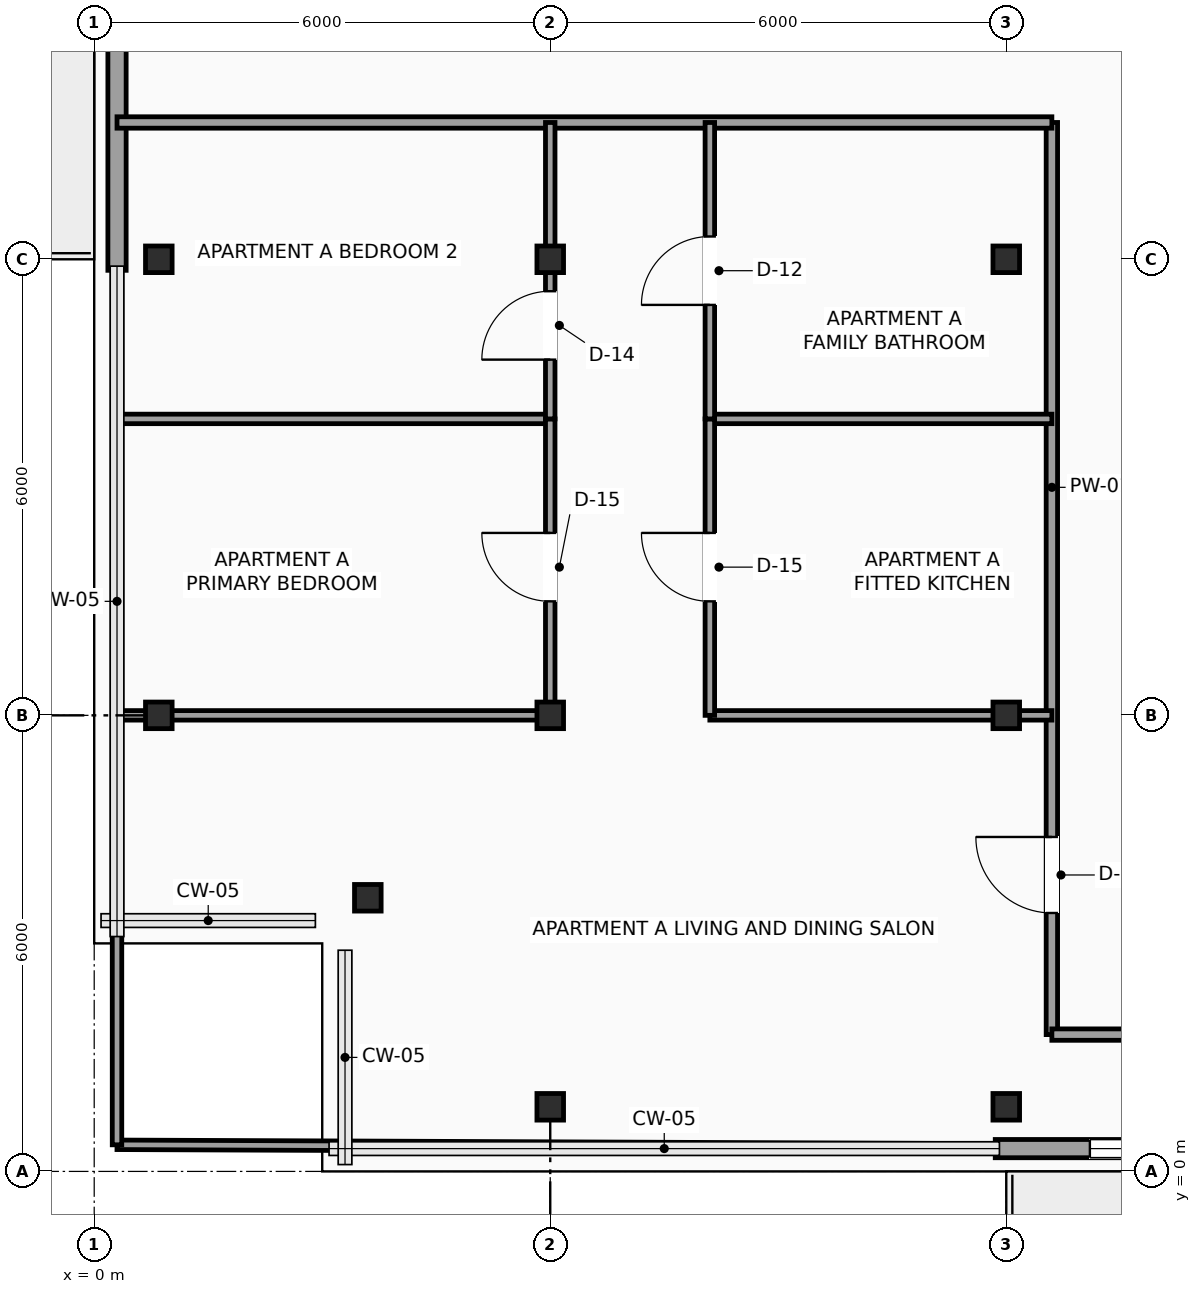
"""IFC4 building model, lengths in metres.
Left out: names, types, materials, properties, quantities, classifications, styles, units other than length and angle.
Written with IfcOpenShell. Run it as: python <this file> out.ifc"""

import sys

from ifc_helpers import new_model, si_unit, direction, frame, frame_2d, origin, origin_2d, place, context, subcontext, project, spatial, rectangle, hollow_rectangle, extrude, element, fill, save


model = new_model("IFC4")
c1 = context("Model", 3, precision=1e-05, world=origin(), true_north=direction((0.0, 1.0)))
c2 = subcontext(c1, "Body", "Model", "MODEL_VIEW")
j1 = project(units=[si_unit("LENGTHUNIT", "METRE"), si_unit("PLANEANGLEUNIT", "RADIAN")], contexts=[c1])
p1 = place(None, origin())
s1 = spatial("IfcSite", under=j1, at=p1, CompositionType="ELEMENT")
p2 = place(p1, origin())
s2 = spatial("IfcBuilding", under=s1, at=p2, CompositionType="ELEMENT")
p3 = place(p2, frame((0.0, 0.0, 264.2)))
s3 = spatial("IfcBuildingStorey", under=s2, at=p3, CompositionType="ELEMENT", Elevation=264.2)
for number, where, z_axis, x_axis in (
    (1, (3.6, 3.6, 0.0), (0.0, 0.0, 1.0), (1.0, 0.0, 0.0)),
    (2, (0.85, 6.0, 0.0), (0.0, 0.0, 1.0), (1.0, 0.0, 0.0)),
    (3, (0.85, 12.0, 0.0), (0.0, 0.0, 1.0), (1.0, 0.0, 0.0)),
    (4, (6.0, 0.85, 0.0), (0.0, 0.0, 1.0), (1.0, 0.0, 0.0)),
    (5, (6.0, 6.0, 0.0), (0.0, 0.0, 1.0), (1.0, 0.0, 0.0)),
    (6, (6.0, 12.0, 0.0), (0.0, 0.0, 1.0), (1.0, 0.0, 0.0)),
    (7, (12.0, 0.85, 0.0), (0.0, 0.0, 1.0), (1.0, 0.0, 0.0)),
    (8, (12.0, 6.0, 0.0), (0.0, 0.0, 1.0), (1.0, 0.0, 0.0)),
    (9, (12.0, 12.0, 0.0), (0.0, 0.0, 1.0), (1.0, 0.0, 0.0)),
):
    element("IfcColumn", number, at=place(p3, frame(where, z_axis=z_axis, x_axis=x_axis)), inside=s3, PredefinedType="COLUMN", context=c2, shape_type="SweptSolid", body=[
        extrude(hollow_rectangle(XDim=0.35, YDim=0.35, WallThickness=0.016, InnerFilletRadius=0.016, OuterFilletRadius=0.032, at=origin_2d()), origin(), (0.0, 0.0, 1.0), 3.5),
    ])
p4 = place(p3, frame((21.145, 0.3, 0.0), z_axis=(0.0, 0.0, 1.0), x_axis=(-1.0, 0.0, 0.0)))
e10 = element("IfcWall", 10, at=p4, inside=s3, PredefinedType="SOLIDWALL", context=c2, shape_type="SweptSolid", body=[
    extrude(rectangle(XDim=9.29, YDim=0.24, at=frame_2d((4.645, 0.0))), origin(), (0.0, 0.0, 1.0), 3.3),
])
p5 = place(p4, frame((3.945, 0.0, 0.0)))
e11 = element("IfcOpeningElement", 11, at=p5, cuts=e10, PredefinedType="OPENING", context=c2, shape_type="SweptSolid", body=[
    extrude(rectangle(XDim=1.05, YDim=2.2, at=frame_2d((0.525, 1.1))), frame((0.0, 0.13, 0.0), z_axis=(0.0, -1.0, 0.0), x_axis=(1.0, 0.0, 0.0)), (0.0, 0.0, 1.0), 0.26),
])
p6 = place(p4, frame((5.345, 0.0, 0.6)))
e12 = element("IfcOpeningElement", 12, at=p6, cuts=e10, PredefinedType="OPENING", context=c2, shape_type="SweptSolid", body=[
    extrude(rectangle(XDim=2.7, YDim=2.3, at=frame_2d((1.35, 1.15))), frame((0.0, 0.13, 0.0), z_axis=(0.0, -1.0, 0.0), x_axis=(1.0, 0.0, 0.0)), (0.0, 0.0, 1.0), 0.26),
])
p7 = place(p4, frame((1.4, 0.0, 0.6)))
e13 = element("IfcOpeningElement", 13, at=p7, cuts=e10, PredefinedType="OPENING", context=c2, shape_type="SweptSolid", body=[
    extrude(rectangle(XDim=0.9, YDim=2.2, at=frame_2d((0.45, 1.1))), frame((0.0, 0.13, 0.0), z_axis=(0.0, -1.0, 0.0), x_axis=(1.0, 0.0, 0.0)), (0.0, 0.0, 1.0), 0.26),
])
p8 = place(p3, frame((0.3, 11.855, 0.0), z_axis=(0.0, 0.0, 1.0), x_axis=(0.0, 1.0, 0.0)))
e14 = element("IfcWall", 14, at=p8, inside=s3, PredefinedType="SOLIDWALL", context=c2, shape_type="SweptSolid", body=[
    extrude(rectangle(XDim=9.29, YDim=0.24, at=frame_2d((4.645, 0.0))), origin(), (0.0, 0.0, 1.0), 3.3),
])
p9 = place(p8, frame((4.7, 0.0, 0.0)))
e15 = element("IfcOpeningElement", 15, at=p9, cuts=e14, PredefinedType="OPENING", context=c2, shape_type="SweptSolid", body=[
    extrude(rectangle(XDim=1.05, YDim=2.2, at=frame_2d((0.525, 1.1))), frame((0.0, 0.13, 0.0), z_axis=(0.0, -1.0, 0.0), x_axis=(1.0, 0.0, 0.0)), (0.0, 0.0, 1.0), 0.26),
])
p10 = place(p8, frame((6.05, 0.0, 0.6)))
e16 = element("IfcOpeningElement", 16, at=p10, cuts=e14, PredefinedType="OPENING", context=c2, shape_type="SweptSolid", body=[
    extrude(rectangle(XDim=2.7, YDim=2.3, at=frame_2d((1.35, 1.15))), frame((0.0, 0.13, 0.0), z_axis=(0.0, -1.0, 0.0), x_axis=(1.0, 0.0, 0.0)), (0.0, 0.0, 1.0), 0.26),
])
p11 = place(p8, frame((2.9, 0.0, 0.6)))
e17 = element("IfcOpeningElement", 17, at=p11, cuts=e14, PredefinedType="OPENING", context=c2, shape_type="SweptSolid", body=[
    extrude(rectangle(XDim=0.9, YDim=2.2, at=frame_2d((0.45, 1.1))), frame((0.0, 0.13, 0.0), z_axis=(0.0, -1.0, 0.0), x_axis=(1.0, 0.0, 0.0)), (0.0, 0.0, 1.0), 0.26),
])
p12 = place(p3, frame((12.6, 1.8, 0.0), z_axis=(0.0, 0.0, 1.0), x_axis=(0.0, 1.0, 0.0)))
e18 = element("IfcWall", 18, at=p12, inside=s3, PredefinedType="PARTITIONING", context=c2, shape_type="SweptSolid", body=[
    extrude(rectangle(XDim=12.0, YDim=0.15, at=frame_2d((6.0, 0.0))), origin(), (0.0, 0.0, 1.0), 3.3),
])
p13 = place(p12, frame((1.6, 0.0, 0.0)))
e19 = element("IfcOpeningElement", 19, at=p13, cuts=e18, PredefinedType="OPENING", context=c2, shape_type="SweptSolid", body=[
    extrude(rectangle(XDim=1.0, YDim=2.2, at=frame_2d((0.5, 1.1))), frame((0.0, 0.085, 0.0), z_axis=(0.0, -1.0, 0.0), x_axis=(1.0, 0.0, 0.0)), (0.0, 0.0, 1.0), 0.17),
])
p14 = place(p3, frame((12.6, 13.8, 0.0), z_axis=(0.0, 0.0, 1.0), x_axis=(-1.0, 0.0, 0.0)))
e20 = element("IfcWall", 20, at=p14, inside=s3, PredefinedType="PARTITIONING", context=c2, shape_type="SweptSolid", body=[
    extrude(rectangle(XDim=12.3, YDim=0.15, at=frame_2d((6.15, 0.0))), origin(), (0.0, 0.0, 1.0), 3.3),
])
p15 = place(p3, frame((14.95, 1.8, 0.0), z_axis=(0.0, 0.0, 1.0), x_axis=(-1.0, 0.0, 0.0)))
e21 = element("IfcWall", 21, at=p15, inside=s3, PredefinedType="PARTITIONING", context=c2, shape_type="SweptSolid", body=[
    extrude(rectangle(XDim=2.35, YDim=0.15, at=frame_2d((1.175, 0.0))), origin(), (0.0, 0.0, 1.0), 3.3),
])
p16 = place(p3, frame((0.3, 0.35, 0.0), z_axis=(0.0, 0.0, 1.0), x_axis=(0.999991685722, -0.004077804208, 0.0)))
e22 = element("IfcWall", 22, at=p16, inside=s3, PredefinedType="PARTITIONING", context=c2, shape_type="SweptSolid", body=[
    extrude(rectangle(XDim=11.555, YDim=0.125, at=frame_2d((5.777, 0.0))), origin(), (0.0, 0.0, 1.0), 3.3),
])
p17 = place(p3, frame((0.3, 0.35, 0.0), z_axis=(0.0, 0.0, 1.0), x_axis=(0.0, 1.0, 0.0)))
e23 = element("IfcWall", 23, at=p17, inside=s3, PredefinedType="PARTITIONING", context=c2, shape_type="SweptSolid", body=[
    extrude(rectangle(XDim=11.505, YDim=0.125, at=frame_2d((5.752, 0.0))), origin(), (0.0, 0.0, 1.0), 3.3),
])
p18 = place(p3, frame((8.1, 6.0, 0.0), z_axis=(0.0, 0.0, 1.0), x_axis=(1.0, 0.0, 0.0)))
e24 = element("IfcWall", 24, at=p18, inside=s3, PredefinedType="PARTITIONING", context=c2, shape_type="SweptSolid", body=[
    extrude(rectangle(XDim=4.5, YDim=0.125, at=frame_2d((2.25, 0.0))), origin(), (0.0, 0.0, 1.0), 2.992),
])
p19 = place(p3, frame((8.1, 9.9, 0.0), z_axis=(0.0, 0.0, 1.0), x_axis=(1.0, 0.0, 0.0)))
e25 = element("IfcWall", 25, at=p19, inside=s3, PredefinedType="PARTITIONING", context=c2, shape_type="SweptSolid", body=[
    extrude(rectangle(XDim=4.5, YDim=0.125, at=frame_2d((2.25, 0.0))), origin(), (0.0, 0.0, 1.0), 3.3),
])
p20 = place(p3, frame((8.1, 6.0, 0.0), z_axis=(0.0, 0.0, 1.0), x_axis=(0.0, 1.0, 0.0)))
e26 = element("IfcWall", 26, at=p20, inside=s3, PredefinedType="PARTITIONING", context=c2, shape_type="SweptSolid", body=[
    extrude(rectangle(XDim=3.9, YDim=0.125, at=frame_2d((1.95, 0.0))), origin(), (0.0, 0.0, 1.0), 3.3),
])
p21 = place(p20, frame((1.5, 0.0, 0.0)))
e27 = element("IfcOpeningElement", 27, at=p21, cuts=e26, PredefinedType="OPENING", context=c2, shape_type="SweptSolid", body=[
    extrude(rectangle(XDim=0.9, YDim=2.1, at=frame_2d((0.45, 1.05))), frame((0.0, 0.073, 0.0), z_axis=(0.0, -1.0, 0.0), x_axis=(1.0, 0.0, 0.0)), (0.0, 0.0, 1.0), 0.145),
])
p22 = place(p3, frame((8.1, 9.9, 0.0), z_axis=(0.0, 0.0, 1.0), x_axis=(0.0, 1.0, 0.0)))
e28 = element("IfcWall", 28, at=p22, inside=s3, PredefinedType="PARTITIONING", context=c2, shape_type="SweptSolid", body=[
    extrude(rectangle(XDim=3.9, YDim=0.125, at=frame_2d((1.95, 0.0))), origin(), (0.0, 0.0, 1.0), 3.3),
])
p23 = place(p22, frame((1.5, 0.0, 0.0)))
e29 = element("IfcOpeningElement", 29, at=p23, cuts=e28, PredefinedType="OPENING", context=c2, shape_type="SweptSolid", body=[
    extrude(rectangle(XDim=0.9, YDim=2.1, at=frame_2d((0.45, 1.05))), frame((0.0, 0.073, 0.0), z_axis=(0.0, -1.0, 0.0), x_axis=(1.0, 0.0, 0.0)), (0.0, 0.0, 1.0), 0.145),
])
p24 = place(p3, frame((0.3, 6.0, 0.0), z_axis=(0.0, 0.0, 1.0), x_axis=(1.0, 0.0, 0.0)))
e30 = element("IfcWall", 30, at=p24, inside=s3, PredefinedType="PARTITIONING", context=c2, shape_type="SweptSolid", body=[
    extrude(rectangle(XDim=5.7, YDim=0.125, at=frame_2d((2.85, 0.0))), origin(), (0.0, 0.0, 1.0), 2.992),
])
p25 = place(p3, frame((0.3, 9.9, 0.0), z_axis=(0.0, 0.0, 1.0), x_axis=(1.0, 0.0, 0.0)))
e31 = element("IfcWall", 31, at=p25, inside=s3, PredefinedType="PARTITIONING", context=c2, shape_type="SweptSolid", body=[
    extrude(rectangle(XDim=5.7, YDim=0.125, at=frame_2d((2.85, 0.0))), origin(), (0.0, 0.0, 1.0), 3.3),
])
p26 = place(p3, frame((6.0, 6.0, 0.0), z_axis=(0.0, 0.0, 1.0), x_axis=(0.0, 1.0, 0.0)))
e32 = element("IfcWall", 32, at=p26, inside=s3, PredefinedType="PARTITIONING", context=c2, shape_type="SweptSolid", body=[
    extrude(rectangle(XDim=3.9, YDim=0.125, at=frame_2d((1.95, 0.0))), origin(), (0.0, 0.0, 1.0), 2.992),
])
p27 = place(p26, frame((1.5, 0.0, 0.0)))
e33 = element("IfcOpeningElement", 33, at=p27, cuts=e32, PredefinedType="OPENING", context=c2, shape_type="SweptSolid", body=[
    extrude(rectangle(XDim=0.9, YDim=2.1, at=frame_2d((0.45, 1.05))), frame((0.0, 0.073, 0.0), z_axis=(0.0, -1.0, 0.0), x_axis=(1.0, 0.0, 0.0)), (0.0, 0.0, 1.0), 0.145),
])
p28 = place(p3, frame((6.0, 9.9, 0.0), z_axis=(0.0, 0.0, 1.0), x_axis=(0.0, 1.0, 0.0)))
e34 = element("IfcWall", 34, at=p28, inside=s3, PredefinedType="PARTITIONING", context=c2, shape_type="SweptSolid", body=[
    extrude(rectangle(XDim=3.9, YDim=0.125, at=frame_2d((1.95, 0.0))), origin(), (0.0, 0.0, 1.0), 2.992),
])
p29 = place(p28, frame((0.78, 0.0, 0.0)))
e35 = element("IfcOpeningElement", 35, at=p29, cuts=e34, PredefinedType="OPENING", context=c2, shape_type="SweptSolid", body=[
    extrude(rectangle(XDim=0.9, YDim=2.1, at=frame_2d((0.45, 1.05))), frame((0.0, 0.073, 0.0), z_axis=(0.0, -1.0, 0.0), x_axis=(1.0, 0.0, 0.0)), (0.0, 0.0, 1.0), 0.145),
])
p30 = place(p6, origin())
e36 = element("IfcWindow", 36, at=p30, inside=s3, PartitioningType="SINGLE_PANEL", PredefinedType="WINDOW", context=c2, shape_type="SweptSolid", body=[
    extrude(rectangle(XDim=2.7, YDim=2.3, at=frame_2d((1.35, 1.15))), frame((0.0, 0.03, 0.0), z_axis=(0.0, -1.0, 0.0), x_axis=(1.0, 0.0, 0.0)), (0.0, 0.0, 1.0), 0.06),
])
fill(e12, e36)
p31 = place(p13, origin())
e37 = element("IfcDoor", 37, at=p31, inside=s3, OperationType="SINGLE_SWING_RIGHT", PredefinedType="DOOR", context=c2, shape_type="SweptSolid", body=[
    extrude(rectangle(XDim=1.0, YDim=2.2, at=frame_2d((0.5, 1.1))), frame((0.0, 0.025, 0.0), z_axis=(0.0, -1.0, 0.0), x_axis=(1.0, 0.0, 0.0)), (0.0, 0.0, 1.0), 0.05),
])
fill(e19, e37)
p32 = place(p21, origin())
e38 = element("IfcDoor", 38, at=p32, inside=s3, OperationType="SINGLE_SWING_RIGHT", PredefinedType="DOOR", context=c2, shape_type="SweptSolid", body=[
    extrude(rectangle(XDim=0.9, YDim=2.1, at=frame_2d((0.45, 1.05))), frame((0.0, 0.025, 0.0), z_axis=(0.0, -1.0, 0.0), x_axis=(1.0, 0.0, 0.0)), (0.0, 0.0, 1.0), 0.05),
])
fill(e27, e38)
p33 = place(p23, origin())
e39 = element("IfcDoor", 39, at=p33, inside=s3, OperationType="SINGLE_SWING_LEFT", PredefinedType="DOOR", context=c2, shape_type="SweptSolid", body=[
    extrude(rectangle(XDim=0.9, YDim=2.1, at=frame_2d((0.45, 1.05))), frame((0.0, 0.025, 0.0), z_axis=(0.0, -1.0, 0.0), x_axis=(1.0, 0.0, 0.0)), (0.0, 0.0, 1.0), 0.05),
])
fill(e29, e39)
p34 = place(p27, origin())
e40 = element("IfcDoor", 40, at=p34, inside=s3, OperationType="SINGLE_SWING_RIGHT", PredefinedType="DOOR", context=c2, shape_type="SweptSolid", body=[
    extrude(rectangle(XDim=0.9, YDim=2.1, at=frame_2d((0.45, 1.05))), frame((0.0, 0.025, 0.0), z_axis=(0.0, -1.0, 0.0), x_axis=(1.0, 0.0, 0.0)), (0.0, 0.0, 1.0), 0.05),
])
fill(e33, e40)
p35 = place(p29, origin())
e41 = element("IfcDoor", 41, at=p35, inside=s3, OperationType="SINGLE_SWING_LEFT", PredefinedType="DOOR", context=c2, shape_type="SweptSolid", body=[
    extrude(rectangle(XDim=0.9, YDim=2.1, at=frame_2d((0.45, 1.05))), frame((0.0, 0.025, 0.0), z_axis=(0.0, -1.0, 0.0), x_axis=(1.0, 0.0, 0.0)), (0.0, 0.0, 1.0), 0.05),
])
fill(e35, e41)
save(model, sys.argv[1])
